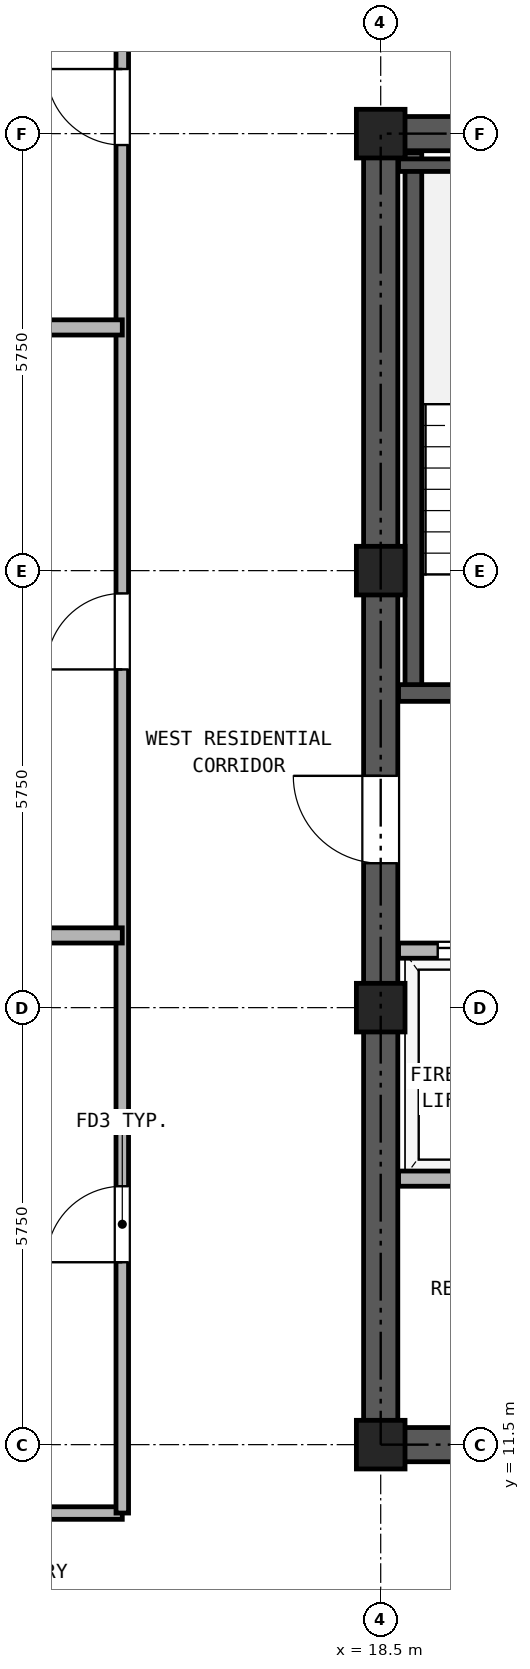
"""IFC4 building model, lengths in metres.
Left out: names, types, materials, properties, quantities, classifications, styles, units other than length and angle.
Written with IfcOpenShell. Run it as: python <this file> out.ifc"""

import sys

from ifc_helpers import new_model, si_unit, direction, frame, frame_2d, origin, origin_2d, place, context, subcontext, project, spatial, rectangle, hollow_rectangle, extrude, source, transform, mapped, element, fill, save


model = new_model("IFC4")
c1 = context("Model", 3, precision=1e-05, world=origin(), true_north=direction((0.0, 1.0)))
c2 = subcontext(c1, "Body", "Model", "MODEL_VIEW")
j1 = project(units=[si_unit("LENGTHUNIT", "METRE"), si_unit("PLANEANGLEUNIT", "RADIAN")], contexts=[c1])
p1 = place(None, origin())
s1 = spatial("IfcSite", under=j1, at=p1, CompositionType="ELEMENT")
p2 = place(p1, origin())
s2 = spatial("IfcBuilding", under=s1, at=p2, CompositionType="ELEMENT")
p3 = place(p2, frame((0.0, 0.0, 193.2)))
s3 = spatial("IfcBuildingStorey", under=s2, at=p3, CompositionType="ELEMENT", Elevation=193.2)
m1 = source(origin(), c2, "Body", "SweptSolid", [
    extrude(hollow_rectangle(XDim=0.64, YDim=0.64, WallThickness=0.035, at=origin_2d()), origin(), (0.0, 0.0, 1.0), 2.95),
])
for number, where, z_axis, x_axis in (
    (1, (18.5, 11.5, 0.0), (0.0, 0.0, 1.0), (1.0, 0.0, 0.0)),
    (2, (18.5, 17.25, 0.0), (0.0, 0.0, 1.0), (1.0, 0.0, 0.0)),
    (3, (18.5, 23.0, 0.0), (0.0, 0.0, 1.0), (1.0, 0.0, 0.0)),
    (4, (18.5, 28.75, 0.0), (0.0, 0.0, 1.0), (1.0, 0.0, 0.0)),
):
    element("IfcColumn", number, at=place(p3, frame(where, z_axis=z_axis, x_axis=x_axis)), inside=s3, PredefinedType="COLUMN", context=c2, shape_type="MappedRepresentation", body=[
        mapped(m1, transform((0.0, 0.0, 0.0), x_axis=(1.0, 0.0, 0.0), y_axis=(0.0, 1.0, 0.0), z_axis=(0.0, 0.0, 1.0), scale=1.0)),
    ])
p4 = place(p3, frame((18.275, 11.5, 0.0), z_axis=(0.0, 0.0, 1.0), x_axis=(1.0, 0.0, 0.0)))
e5 = element("IfcWall", 5, at=p4, inside=s3, PredefinedType="SHEAR", context=c2, shape_type="SweptSolid", body=[
    extrude(rectangle(XDim=10.45, YDim=0.45, at=frame_2d((5.225, 0.0))), origin(), (0.0, 0.0, 1.0), 2.95),
])
p5 = place(p4, frame((1.825, 0.0, 0.0)))
e6 = element("IfcOpeningElement", 6, at=p5, cuts=e5, PredefinedType="OPENING", context=c2, shape_type="SweptSolid", body=[
    extrude(rectangle(XDim=0.95, YDim=2.15, at=frame_2d((0.475, 1.075))), frame((0.0, 0.235, 0.0), z_axis=(0.0, -1.0, 0.0), x_axis=(1.0, 0.0, 0.0)), (0.0, 0.0, 1.0), 0.47),
])
p6 = place(p4, frame((5.325, 0.0, 0.0)))
e7 = element("IfcOpeningElement", 7, at=p6, cuts=e5, PredefinedType="OPENING", context=c2, shape_type="SweptSolid", body=[
    extrude(rectangle(XDim=0.95, YDim=2.15, at=frame_2d((0.475, 1.075))), frame((0.0, 0.235, 0.0), z_axis=(0.0, -1.0, 0.0), x_axis=(1.0, 0.0, 0.0)), (0.0, 0.0, 1.0), 0.47),
])
p7 = place(p4, frame((8.225, 0.0, 0.0)))
e8 = element("IfcOpeningElement", 8, at=p7, cuts=e5, PredefinedType="OPENING", context=c2, shape_type="SweptSolid", body=[
    extrude(rectangle(XDim=1.1, YDim=2.25, at=frame_2d((0.55, 1.125))), frame((0.0, 0.235, 0.0), z_axis=(0.0, -1.0, 0.0), x_axis=(1.0, 0.0, 0.0)), (0.0, 0.0, 1.0), 0.47),
])
p8 = place(p3, frame((18.275, 28.75, 0.0), z_axis=(0.0, 0.0, 1.0), x_axis=(1.0, 0.0, 0.0)))
e9 = element("IfcWall", 9, at=p8, inside=s3, PredefinedType="SHEAR", context=c2, shape_type="SweptSolid", body=[
    extrude(rectangle(XDim=10.45, YDim=0.45, at=frame_2d((5.225, 0.0))), origin(), (0.0, 0.0, 1.0), 2.95),
])
p9 = place(p8, frame((4.105, 0.0, 0.0)))
e10 = element("IfcOpeningElement", 10, at=p9, cuts=e9, PredefinedType="OPENING", context=c2, shape_type="SweptSolid", body=[
    extrude(rectangle(XDim=0.9, YDim=2.05, at=frame_2d((0.45, 1.025))), frame((0.0, 0.235, 0.0), z_axis=(0.0, -1.0, 0.0), x_axis=(1.0, 0.0, 0.0)), (0.0, 0.0, 1.0), 0.47),
])
p10 = place(p8, frame((5.645, 0.0, 0.0)))
e11 = element("IfcOpeningElement", 11, at=p10, cuts=e9, PredefinedType="OPENING", context=c2, shape_type="SweptSolid", body=[
    extrude(rectangle(XDim=0.9, YDim=2.05, at=frame_2d((0.45, 1.025))), frame((0.0, 0.235, 0.0), z_axis=(0.0, -1.0, 0.0), x_axis=(1.0, 0.0, 0.0)), (0.0, 0.0, 1.0), 0.47),
])
p11 = place(p3, frame((18.5, 11.725, 0.0), z_axis=(0.0, 0.0, 1.0), x_axis=(0.0, 1.0, 0.0)))
e12 = element("IfcWall", 12, at=p11, inside=s3, PredefinedType="SHEAR", context=c2, shape_type="SweptSolid", body=[
    extrude(rectangle(XDim=16.8, YDim=0.45, at=frame_2d((8.4, 0.0))), origin(), (0.0, 0.0, 1.0), 2.95),
])
p12 = place(p11, frame((7.425, 0.0, 0.0)))
e13 = element("IfcOpeningElement", 13, at=p12, cuts=e12, PredefinedType="OPENING", context=c2, shape_type="SweptSolid", body=[
    extrude(rectangle(XDim=1.15, YDim=2.2, at=frame_2d((0.575, 1.1))), frame((0.0, 0.235, 0.0), z_axis=(0.0, -1.0, 0.0), x_axis=(1.0, 0.0, 0.0)), (0.0, 0.0, 1.0), 0.47),
])
p13 = place(p3, frame((18.93, 21.39, 0.0), z_axis=(0.0, 0.0, 1.0), x_axis=(0.0, 1.0, 0.0)))
e14 = element("IfcWall", 14, at=p13, inside=s3, PredefinedType="SOLIDWALL", context=c2, shape_type="SweptSolid", body=[
    extrude(rectangle(XDim=7.11, YDim=0.22, at=frame_2d((3.555, 0.0))), origin(), (0.0, 0.0, 1.0), 2.95),
])
p14 = place(p3, frame((18.735, 28.335, 0.0), z_axis=(0.0, 0.0, 1.0), x_axis=(1.0, 0.0, 0.0)))
e15 = element("IfcWall", 15, at=p14, inside=s3, PredefinedType="PARTITIONING", context=c2, shape_type="SweptSolid", body=[
    extrude(rectangle(XDim=3.375, YDim=0.165, at=frame_2d((1.688, 0.0))), origin(), (0.0, 0.0, 1.0), 2.95),
])
p15 = place(p3, frame((18.735, 21.39, 0.0), z_axis=(0.0, 0.0, 1.0), x_axis=(1.0, 0.0, 0.0)))
e16 = element("IfcWall", 16, at=p15, inside=s3, PredefinedType="SOLIDWALL", context=c2, shape_type="SweptSolid", body=[
    extrude(rectangle(XDim=6.395, YDim=0.22, at=frame_2d((3.197, 0.0))), origin(), (0.0, 0.0, 1.0), 2.95),
])
p16 = place(p15, frame((1.115, 0.0, 0.0)))
e17 = element("IfcOpeningElement", 17, at=p16, cuts=e16, PredefinedType="OPENING", context=c2, shape_type="SweptSolid", body=[
    extrude(rectangle(XDim=1.15, YDim=2.2, at=frame_2d((0.575, 1.1))), frame((0.0, 0.12, 0.0), z_axis=(0.0, -1.0, 0.0), x_axis=(1.0, 0.0, 0.0)), (0.0, 0.0, 1.0), 0.24),
])
p17 = place(p15, frame((4.845, 0.0, 0.0)))
e18 = element("IfcOpeningElement", 18, at=p17, cuts=e16, PredefinedType="OPENING", context=c2, shape_type="SweptSolid", body=[
    extrude(rectangle(XDim=1.1, YDim=2.25, at=frame_2d((0.55, 1.125))), frame((0.0, 0.12, 0.0), z_axis=(0.0, -1.0, 0.0), x_axis=(1.0, 0.0, 0.0)), (0.0, 0.0, 1.0), 0.24),
])
p18 = place(p3, frame((18.735, 18.0, 0.0), z_axis=(0.0, 0.0, 1.0), x_axis=(1.0, 0.0, 0.0)))
e19 = element("IfcWall", 19, at=p18, inside=s3, PredefinedType="PARTITIONING", context=c2, shape_type="SweptSolid", body=[
    extrude(rectangle(XDim=9.53, YDim=0.2, at=frame_2d((4.765, 0.0))), origin(), (0.0, 0.0, 1.0), 2.95),
])
p19 = place(p18, frame((0.515, 0.0, 0.0)))
e20 = element("IfcOpeningElement", 20, at=p19, cuts=e19, PredefinedType="OPENING", context=c2, shape_type="SweptSolid", body=[
    extrude(rectangle(XDim=1.3, YDim=2.3, at=frame_2d((0.65, 1.15))), frame((0.0, 0.11, 0.0), z_axis=(0.0, -1.0, 0.0), x_axis=(1.0, 0.0, 0.0)), (0.0, 0.0, 1.0), 0.22),
])
p20 = place(p18, frame((2.615, 0.0, 0.0)))
e21 = element("IfcOpeningElement", 21, at=p20, cuts=e19, PredefinedType="OPENING", context=c2, shape_type="SweptSolid", body=[
    extrude(rectangle(XDim=1.3, YDim=2.3, at=frame_2d((0.65, 1.15))), frame((0.0, 0.11, 0.0), z_axis=(0.0, -1.0, 0.0), x_axis=(1.0, 0.0, 0.0)), (0.0, 0.0, 1.0), 0.22),
])
p21 = place(p18, frame((5.035, 0.0, 0.0)))
e22 = element("IfcOpeningElement", 22, at=p21, cuts=e19, PredefinedType="OPENING", context=c2, shape_type="SweptSolid", body=[
    extrude(rectangle(XDim=0.9, YDim=2.05, at=frame_2d((0.45, 1.025))), frame((0.0, 0.11, 0.0), z_axis=(0.0, -1.0, 0.0), x_axis=(1.0, 0.0, 0.0)), (0.0, 0.0, 1.0), 0.22),
])
p22 = place(p18, frame((8.165, 0.0, 0.0)))
e23 = element("IfcOpeningElement", 23, at=p22, cuts=e19, PredefinedType="OPENING", context=c2, shape_type="SweptSolid", body=[
    extrude(rectangle(XDim=0.9, YDim=2.05, at=frame_2d((0.45, 1.025))), frame((0.0, 0.11, 0.0), z_axis=(0.0, -1.0, 0.0), x_axis=(1.0, 0.0, 0.0)), (0.0, 0.0, 1.0), 0.22),
])
p23 = place(p3, frame((18.735, 15.0, 0.0), z_axis=(0.0, 0.0, 1.0), x_axis=(1.0, 0.0, 0.0)))
e24 = element("IfcWall", 24, at=p23, inside=s3, PredefinedType="PARTITIONING", context=c2, shape_type="SweptSolid", body=[
    extrude(rectangle(XDim=9.53, YDim=0.2, at=frame_2d((4.765, 0.0))), origin(), (0.0, 0.0, 1.0), 2.95),
])
p24 = place(p3, frame((7.6, 10.6, 0.0), z_axis=(0.0, 0.0, 1.0), x_axis=(1.0, 0.0, 0.0)))
e25 = element("IfcWall", 25, at=p24, inside=s3, PredefinedType="PARTITIONING", context=c2, shape_type="SweptSolid", body=[
    extrude(rectangle(XDim=7.5, YDim=0.165, at=frame_2d((3.75, 0.0))), origin(), (0.0, 0.0, 1.0), 2.95),
])
p25 = place(p3, frame((15.1, 10.6, 0.0), z_axis=(0.0, 0.0, 1.0), x_axis=(0.0, 1.0, 0.0)))
e26 = element("IfcWall", 26, at=p25, inside=s3, PredefinedType="PARTITIONING", context=c2, shape_type="SweptSolid", body=[
    extrude(rectangle(XDim=24.54, YDim=0.165, at=frame_2d((12.27, 0.0))), origin(), (0.0, 0.0, 1.0), 2.95),
])
p26 = place(p25, frame((3.3, 0.0, 0.0)))
e27 = element("IfcOpeningElement", 27, at=p26, cuts=e26, PredefinedType="OPENING", context=c2, shape_type="SweptSolid", body=[
    extrude(rectangle(XDim=1.0, YDim=2.15, at=frame_2d((0.5, 1.075))), frame((0.0, 0.093, 0.0), z_axis=(0.0, -1.0, 0.0), x_axis=(1.0, 0.0, 0.0)), (0.0, 0.0, 1.0), 0.185),
])
p27 = place(p25, frame((11.1, 0.0, 0.0)))
e28 = element("IfcOpeningElement", 28, at=p27, cuts=e26, PredefinedType="OPENING", context=c2, shape_type="SweptSolid", body=[
    extrude(rectangle(XDim=1.0, YDim=2.15, at=frame_2d((0.5, 1.075))), frame((0.0, 0.093, 0.0), z_axis=(0.0, -1.0, 0.0), x_axis=(1.0, 0.0, 0.0)), (0.0, 0.0, 1.0), 0.185),
])
p28 = place(p25, frame((18.0, 0.0, 0.0)))
e29 = element("IfcOpeningElement", 29, at=p28, cuts=e26, PredefinedType="OPENING", context=c2, shape_type="SweptSolid", body=[
    extrude(rectangle(XDim=1.0, YDim=2.15, at=frame_2d((0.5, 1.075))), frame((0.0, 0.093, 0.0), z_axis=(0.0, -1.0, 0.0), x_axis=(1.0, 0.0, 0.0)), (0.0, 0.0, 1.0), 0.185),
])
for number, where, z_axis, x_axis in (
    (30, (0.16, 18.2, 0.0), (0.0, 0.0, 1.0), (1.0, 0.0, 0.0)),
    (31, (0.16, 26.2, 0.0), (0.0, 0.0, 1.0), (1.0, 0.0, 0.0)),
):
    element("IfcWall", number, at=place(p3, frame(where, z_axis=z_axis, x_axis=x_axis)), inside=s3, PredefinedType="PARTITIONING", context=c2, shape_type="SweptSolid", body=[
        extrude(rectangle(XDim=14.94, YDim=0.2, at=frame_2d((7.47, 0.0))), origin(), (0.0, 0.0, 1.0), 2.95),
    ])
p29 = place(p19, origin())
e32 = element("IfcDoor", 32, at=p29, inside=s3, OperationType="DOUBLE_DOOR_SLIDING", PredefinedType="DOOR", context=c2, shape_type="SweptSolid", body=[
    extrude(rectangle(XDim=1.3, YDim=2.3, at=frame_2d((0.65, 1.15))), frame((0.0, 0.025, 0.0), z_axis=(0.0, -1.0, 0.0), x_axis=(1.0, 0.0, 0.0)), (0.0, 0.0, 1.0), 0.05),
])
fill(e20, e32)
p30 = place(p12, frame((1.15, 0.0, 0.0), z_axis=(0.0, 0.0, 1.0), x_axis=(-1.0, 0.0, 0.0)))
e33 = element("IfcDoor", 33, at=p30, inside=s3, OperationType="SINGLE_SWING_RIGHT", PredefinedType="DOOR", context=c2, shape_type="SweptSolid", body=[
    extrude(rectangle(XDim=1.15, YDim=2.2, at=frame_2d((0.575, 1.1))), frame((0.0, 0.025, 0.0), z_axis=(0.0, -1.0, 0.0), x_axis=(1.0, 0.0, 0.0)), (0.0, 0.0, 1.0), 0.05),
])
fill(e13, e33)
p31 = place(p26, origin())
e34 = element("IfcDoor", 34, at=p31, inside=s3, OperationType="SINGLE_SWING_LEFT", PredefinedType="DOOR", context=c2, shape_type="SweptSolid", body=[
    extrude(rectangle(XDim=1.0, YDim=2.15, at=frame_2d((0.5, 1.075))), frame((0.0, 0.025, 0.0), z_axis=(0.0, -1.0, 0.0), x_axis=(1.0, 0.0, 0.0)), (0.0, 0.0, 1.0), 0.05),
])
fill(e27, e34)
p32 = place(p27, origin())
e35 = element("IfcDoor", 35, at=p32, inside=s3, OperationType="SINGLE_SWING_LEFT", PredefinedType="DOOR", context=c2, shape_type="SweptSolid", body=[
    extrude(rectangle(XDim=1.0, YDim=2.15, at=frame_2d((0.5, 1.075))), frame((0.0, 0.025, 0.0), z_axis=(0.0, -1.0, 0.0), x_axis=(1.0, 0.0, 0.0)), (0.0, 0.0, 1.0), 0.05),
])
fill(e28, e35)
p33 = place(p28, origin())
e36 = element("IfcDoor", 36, at=p33, inside=s3, OperationType="SINGLE_SWING_RIGHT", PredefinedType="DOOR", context=c2, shape_type="SweptSolid", body=[
    extrude(rectangle(XDim=1.0, YDim=2.15, at=frame_2d((0.5, 1.075))), frame((0.0, 0.025, 0.0), z_axis=(0.0, -1.0, 0.0), x_axis=(1.0, 0.0, 0.0)), (0.0, 0.0, 1.0), 0.05),
])
fill(e29, e36)
save(model, sys.argv[1])
